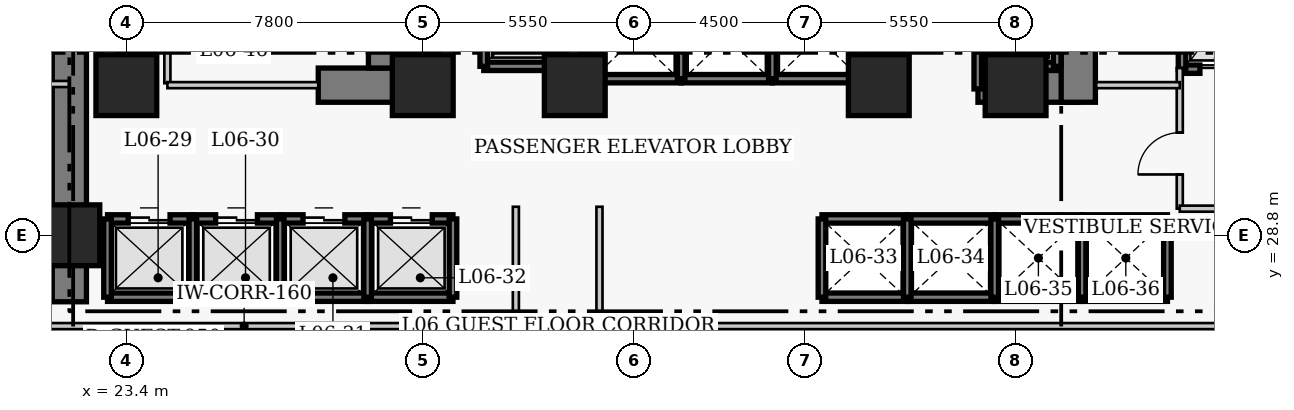
"""IFC4 building model, lengths in metres.
Left out: names, types, materials, properties, quantities, classifications, styles, units other than length and angle.
Written with IfcOpenShell. Run it as: python <this file> out.ifc"""

import sys

from ifc_helpers import new_model, si_unit, direction, frame, frame_2d, origin, origin_2d, place, context, subcontext, project, spatial, rectangle, extrude, element, fill, save


model = new_model("IFC4")
c1 = context("Model", 3, precision=1e-05, world=origin(), true_north=direction((0.0, 1.0)))
c2 = subcontext(c1, "Body", "Model", "MODEL_VIEW")
j1 = project(units=[si_unit("LENGTHUNIT", "METRE"), si_unit("PLANEANGLEUNIT", "RADIAN")], contexts=[c1])
p1 = place(None, origin())
s1 = spatial("IfcSite", under=j1, at=p1, CompositionType="ELEMENT")
p2 = place(p1, origin())
s2 = spatial("IfcBuilding", under=s1, at=p2, CompositionType="ELEMENT")
p3 = place(p2, frame((0.0, 0.0, 29.8)))
s3 = spatial("IfcBuildingStorey", under=s2, at=p3, CompositionType="ELEMENT", Elevation=29.8)
p4 = place(p3, frame((21.9, 27.05, 0.0), z_axis=(0.0, 0.0, 1.0), x_axis=(0.0, 1.0, 0.0)))
e1 = element("IfcWall", 1, at=p4, inside=s3, PredefinedType="SHEAR", context=c2, shape_type="SweptSolid", body=[
    extrude(rectangle(XDim=13.72, YDim=0.9, at=frame_2d((6.86, 0.0))), origin(), (0.0, 0.0, 1.0), 3.8),
])
p5 = place(p3, frame((28.45, 32.75, 0.0), z_axis=(0.0, 0.0, 1.0), x_axis=(1.0, 0.0, 0.0)))
e2 = element("IfcWall", 2, at=p5, inside=s3, PredefinedType="SHEAR", context=c2, shape_type="SweptSolid", body=[
    extrude(rectangle(XDim=2.4, YDim=0.9, at=frame_2d((1.2, 0.0))), origin(), (0.0, 0.0, 1.0), 3.8),
])
p6 = place(p3, frame((45.81, 32.75, 0.0), z_axis=(0.0, 0.0, 1.0), x_axis=(1.0, 0.0, 0.0)))
e3 = element("IfcWall", 3, at=p6, inside=s3, PredefinedType="SHEAR", context=c2, shape_type="SweptSolid", body=[
    extrude(rectangle(XDim=2.64, YDim=0.9, at=frame_2d((1.32, 0.0))), origin(), (0.0, 0.0, 1.0), 3.8),
])
p7 = place(p3, frame((30.22, 33.2, 0.0), z_axis=(0.0, 0.0, 1.0), x_axis=(0.0, 1.0, 0.0)))
e4 = element("IfcWall", 4, at=p7, inside=s3, PredefinedType="SHEAR", context=c2, shape_type="SweptSolid", body=[
    extrude(rectangle(XDim=7.12, YDim=0.9, at=frame_2d((3.56, 0.0))), origin(), (0.0, 0.0, 1.0), 3.8),
])
p8 = place(p3, frame((48.45, 32.3, 0.0), z_axis=(0.0, 0.0, 1.0), x_axis=(0.0, 1.0, 0.0)))
e5 = element("IfcWall", 5, at=p8, inside=s3, PredefinedType="SHEAR", context=c2, shape_type="SweptSolid", body=[
    extrude(rectangle(XDim=8.02, YDim=0.9, at=frame_2d((4.01, 0.0))), origin(), (0.0, 0.0, 1.0), 3.8),
])
p9 = place(p8, frame((5.9, 0.0, 0.0)))
e6 = element("IfcOpeningElement", 6, at=p9, cuts=e5, PredefinedType="OPENING", context=c2, shape_type="SweptSolid", body=[
    extrude(rectangle(XDim=1.1, YDim=2.15, at=frame_2d((0.55, 1.075))), frame((0.0, 0.46, 0.0), z_axis=(0.0, -1.0, 0.0), x_axis=(1.0, 0.0, 0.0)), (0.0, 0.0, 1.0), 0.92),
])
for number, where, z_axis, x_axis in (
    (7, (21.9, 28.8, 0.0), (0.0, 0.0, 1.0), (1.0, 0.0, 0.0)),
    (8, (23.4, 32.75, 0.0), (0.0, 0.0, 1.0), (1.0, 0.0, 0.0)),
    (9, (31.2, 32.75, 0.0), (0.0, 0.0, 1.0), (1.0, 0.0, 0.0)),
    (10, (35.2, 32.75, 0.0), (0.0, 0.0, 1.0), (1.0, 0.0, 0.0)),
    (11, (43.2, 32.75, 0.0), (0.0, 0.0, 1.0), (1.0, 0.0, 0.0)),
    (12, (46.8, 32.75, 0.0), (0.0, 0.0, 1.0), (1.0, 0.0, 0.0)),
):
    element("IfcColumn", number, at=place(p3, frame(where, z_axis=z_axis, x_axis=x_axis)), inside=s3, PredefinedType="COLUMN", context=c2, shape_type="SweptSolid", body=[
        extrude(rectangle(XDim=1.6, YDim=1.6, at=origin_2d()), origin(), (0.0, 0.0, 1.0), 3.8),
    ])
p10 = place(p3, frame((22.905, 29.23, 0.0), z_axis=(0.0, 0.0, 1.0), x_axis=(1.0, 0.0, 0.0)))
e13 = element("IfcWall", 13, at=p10, inside=s3, PredefinedType="SHEAR", context=c2, shape_type="SweptSolid", body=[
    extrude(rectangle(XDim=2.245, YDim=0.22, at=frame_2d((1.123, 0.0))), origin(), (0.0, 0.0, 1.0), 3.8),
])
p11 = place(p10, frame((0.545, 0.0, 0.0)))
e14 = element("IfcOpeningElement", 14, at=p11, cuts=e13, PredefinedType="OPENING", context=c2, shape_type="SweptSolid", body=[
    extrude(rectangle(XDim=1.1, YDim=2.15, at=frame_2d((0.55, 1.075))), frame((0.0, 0.12, 0.0), z_axis=(0.0, -1.0, 0.0), x_axis=(1.0, 0.0, 0.0)), (0.0, 0.0, 1.0), 0.24),
])
p12 = place(p3, frame((22.905, 27.17, 0.0), z_axis=(0.0, 0.0, 1.0), x_axis=(1.0, 0.0, 0.0)))
e15 = element("IfcWall", 15, at=p12, inside=s3, PredefinedType="SHEAR", context=c2, shape_type="SweptSolid", body=[
    extrude(rectangle(XDim=2.245, YDim=0.22, at=frame_2d((1.123, 0.0))), origin(), (0.0, 0.0, 1.0), 3.8),
])
p13 = place(p3, frame((22.905, 27.17, 0.0), z_axis=(0.0, 0.0, 1.0), x_axis=(0.0, 1.0, 0.0)))
e16 = element("IfcWall", 16, at=p13, inside=s3, PredefinedType="SHEAR", context=c2, shape_type="SweptSolid", body=[
    extrude(rectangle(XDim=2.06, YDim=0.2, at=frame_2d((1.03, 0.0))), origin(), (0.0, 0.0, 1.0), 3.8),
])
p14 = place(p3, frame((25.15, 29.23, 0.0), z_axis=(0.0, 0.0, 1.0), x_axis=(1.0, 0.0, 0.0)))
e17 = element("IfcWall", 17, at=p14, inside=s3, PredefinedType="SHEAR", context=c2, shape_type="SweptSolid", body=[
    extrude(rectangle(XDim=2.3, YDim=0.22, at=frame_2d((1.15, 0.0))), origin(), (0.0, 0.0, 1.0), 3.8),
])
p15 = place(p14, frame((0.6, 0.0, 0.0)))
e18 = element("IfcOpeningElement", 18, at=p15, cuts=e17, PredefinedType="OPENING", context=c2, shape_type="SweptSolid", body=[
    extrude(rectangle(XDim=1.1, YDim=2.15, at=frame_2d((0.55, 1.075))), frame((0.0, 0.12, 0.0), z_axis=(0.0, -1.0, 0.0), x_axis=(1.0, 0.0, 0.0)), (0.0, 0.0, 1.0), 0.24),
])
p16 = place(p3, frame((25.15, 27.17, 0.0), z_axis=(0.0, 0.0, 1.0), x_axis=(1.0, 0.0, 0.0)))
e19 = element("IfcWall", 19, at=p16, inside=s3, PredefinedType="SHEAR", context=c2, shape_type="SweptSolid", body=[
    extrude(rectangle(XDim=2.3, YDim=0.22, at=frame_2d((1.15, 0.0))), origin(), (0.0, 0.0, 1.0), 3.8),
])
p17 = place(p3, frame((25.15, 27.17, 0.0), z_axis=(0.0, 0.0, 1.0), x_axis=(0.0, 1.0, 0.0)))
e20 = element("IfcWall", 20, at=p17, inside=s3, PredefinedType="SHEAR", context=c2, shape_type="SweptSolid", body=[
    extrude(rectangle(XDim=2.06, YDim=0.2, at=frame_2d((1.03, 0.0))), origin(), (0.0, 0.0, 1.0), 3.8),
])
p18 = place(p3, frame((27.45, 29.23, 0.0), z_axis=(0.0, 0.0, 1.0), x_axis=(1.0, 0.0, 0.0)))
e21 = element("IfcWall", 21, at=p18, inside=s3, PredefinedType="SHEAR", context=c2, shape_type="SweptSolid", body=[
    extrude(rectangle(XDim=2.3, YDim=0.22, at=frame_2d((1.15, 0.0))), origin(), (0.0, 0.0, 1.0), 3.8),
])
p19 = place(p18, frame((0.6, 0.0, 0.0)))
e22 = element("IfcOpeningElement", 22, at=p19, cuts=e21, PredefinedType="OPENING", context=c2, shape_type="SweptSolid", body=[
    extrude(rectangle(XDim=1.1, YDim=2.15, at=frame_2d((0.55, 1.075))), frame((0.0, 0.12, 0.0), z_axis=(0.0, -1.0, 0.0), x_axis=(1.0, 0.0, 0.0)), (0.0, 0.0, 1.0), 0.24),
])
p20 = place(p3, frame((27.45, 27.17, 0.0), z_axis=(0.0, 0.0, 1.0), x_axis=(1.0, 0.0, 0.0)))
e23 = element("IfcWall", 23, at=p20, inside=s3, PredefinedType="SHEAR", context=c2, shape_type="SweptSolid", body=[
    extrude(rectangle(XDim=2.3, YDim=0.22, at=frame_2d((1.15, 0.0))), origin(), (0.0, 0.0, 1.0), 3.8),
])
p21 = place(p3, frame((27.45, 27.17, 0.0), z_axis=(0.0, 0.0, 1.0), x_axis=(0.0, 1.0, 0.0)))
e24 = element("IfcWall", 24, at=p21, inside=s3, PredefinedType="SHEAR", context=c2, shape_type="SweptSolid", body=[
    extrude(rectangle(XDim=2.06, YDim=0.2, at=frame_2d((1.03, 0.0))), origin(), (0.0, 0.0, 1.0), 3.8),
])
p22 = place(p3, frame((29.75, 29.23, 0.0), z_axis=(0.0, 0.0, 1.0), x_axis=(1.0, 0.0, 0.0)))
e25 = element("IfcWall", 25, at=p22, inside=s3, PredefinedType="SHEAR", context=c2, shape_type="SweptSolid", body=[
    extrude(rectangle(XDim=2.245, YDim=0.22, at=frame_2d((1.123, 0.0))), origin(), (0.0, 0.0, 1.0), 3.8),
])
p23 = place(p22, frame((0.6, 0.0, 0.0)))
e26 = element("IfcOpeningElement", 26, at=p23, cuts=e25, PredefinedType="OPENING", context=c2, shape_type="SweptSolid", body=[
    extrude(rectangle(XDim=1.1, YDim=2.15, at=frame_2d((0.55, 1.075))), frame((0.0, 0.12, 0.0), z_axis=(0.0, -1.0, 0.0), x_axis=(1.0, 0.0, 0.0)), (0.0, 0.0, 1.0), 0.24),
])
p24 = place(p3, frame((29.75, 27.17, 0.0), z_axis=(0.0, 0.0, 1.0), x_axis=(1.0, 0.0, 0.0)))
e27 = element("IfcWall", 27, at=p24, inside=s3, PredefinedType="SHEAR", context=c2, shape_type="SweptSolid", body=[
    extrude(rectangle(XDim=2.245, YDim=0.22, at=frame_2d((1.123, 0.0))), origin(), (0.0, 0.0, 1.0), 3.8),
])
for number, where, z_axis, x_axis in (
    (28, (29.75, 27.17, 0.0), (0.0, 0.0, 1.0), (0.0, 1.0, 0.0)),
    (29, (31.995, 27.17, 0.0), (0.0, 0.0, 1.0), (0.0, 1.0, 0.0)),
):
    element("IfcWall", number, at=place(p3, frame(where, z_axis=z_axis, x_axis=x_axis)), inside=s3, PredefinedType="SHEAR", context=c2, shape_type="SweptSolid", body=[
        extrude(rectangle(XDim=2.06, YDim=0.2, at=frame_2d((1.03, 0.0))), origin(), (0.0, 0.0, 1.0), 3.8),
    ])
for number, where, z_axis, x_axis in (
    (30, (41.705, 29.23, 0.0), (0.0, 0.0, 1.0), (1.0, 0.0, 0.0)),
    (31, (41.705, 27.17, 0.0), (0.0, 0.0, 1.0), (1.0, 0.0, 0.0)),
):
    element("IfcWall", number, at=place(p3, frame(where, z_axis=z_axis, x_axis=x_axis)), inside=s3, PredefinedType="SHEAR", context=c2, shape_type="SweptSolid", body=[
        extrude(rectangle(XDim=2.245, YDim=0.22, at=frame_2d((1.123, 0.0))), origin(), (0.0, 0.0, 1.0), 3.8),
    ])
p25 = place(p3, frame((41.705, 27.17, 0.0), z_axis=(0.0, 0.0, 1.0), x_axis=(0.0, 1.0, 0.0)))
e32 = element("IfcWall", 32, at=p25, inside=s3, PredefinedType="SHEAR", context=c2, shape_type="SweptSolid", body=[
    extrude(rectangle(XDim=2.06, YDim=0.2, at=frame_2d((1.03, 0.0))), origin(), (0.0, 0.0, 1.0), 3.8),
])
for number, where, z_axis, x_axis in (
    (33, (43.95, 29.23, 0.0), (0.0, 0.0, 1.0), (1.0, 0.0, 0.0)),
    (34, (43.95, 27.17, 0.0), (0.0, 0.0, 1.0), (1.0, 0.0, 0.0)),
):
    element("IfcWall", number, at=place(p3, frame(where, z_axis=z_axis, x_axis=x_axis)), inside=s3, PredefinedType="SHEAR", context=c2, shape_type="SweptSolid", body=[
        extrude(rectangle(XDim=2.3, YDim=0.22, at=frame_2d((1.15, 0.0))), origin(), (0.0, 0.0, 1.0), 3.8),
    ])
p26 = place(p3, frame((43.95, 27.17, 0.0), z_axis=(0.0, 0.0, 1.0), x_axis=(0.0, 1.0, 0.0)))
e35 = element("IfcWall", 35, at=p26, inside=s3, PredefinedType="SHEAR", context=c2, shape_type="SweptSolid", body=[
    extrude(rectangle(XDim=2.06, YDim=0.2, at=frame_2d((1.03, 0.0))), origin(), (0.0, 0.0, 1.0), 3.8),
])
for number, where, z_axis, x_axis in (
    (36, (46.25, 29.23, 0.0), (0.0, 0.0, 1.0), (1.0, 0.0, 0.0)),
    (37, (46.25, 27.17, 0.0), (0.0, 0.0, 1.0), (1.0, 0.0, 0.0)),
):
    element("IfcWall", number, at=place(p3, frame(where, z_axis=z_axis, x_axis=x_axis)), inside=s3, PredefinedType="SHEAR", context=c2, shape_type="SweptSolid", body=[
        extrude(rectangle(XDim=2.3, YDim=0.22, at=frame_2d((1.15, 0.0))), origin(), (0.0, 0.0, 1.0), 3.8),
    ])
p27 = place(p3, frame((46.25, 27.17, 0.0), z_axis=(0.0, 0.0, 1.0), x_axis=(0.0, 1.0, 0.0)))
e38 = element("IfcWall", 38, at=p27, inside=s3, PredefinedType="SHEAR", context=c2, shape_type="SweptSolid", body=[
    extrude(rectangle(XDim=2.06, YDim=0.2, at=frame_2d((1.03, 0.0))), origin(), (0.0, 0.0, 1.0), 3.8),
])
for number, where, z_axis, x_axis in (
    (39, (48.55, 29.23, 0.0), (0.0, 0.0, 1.0), (1.0, 0.0, 0.0)),
    (40, (48.55, 27.17, 0.0), (0.0, 0.0, 1.0), (1.0, 0.0, 0.0)),
):
    element("IfcWall", number, at=place(p3, frame(where, z_axis=z_axis, x_axis=x_axis)), inside=s3, PredefinedType="SHEAR", context=c2, shape_type="SweptSolid", body=[
        extrude(rectangle(XDim=2.245, YDim=0.22, at=frame_2d((1.123, 0.0))), origin(), (0.0, 0.0, 1.0), 3.8),
    ])
for number, where, z_axis, x_axis in (
    (41, (48.55, 27.17, 0.0), (0.0, 0.0, 1.0), (0.0, 1.0, 0.0)),
    (42, (50.795, 27.17, 0.0), (0.0, 0.0, 1.0), (0.0, 1.0, 0.0)),
):
    element("IfcWall", number, at=place(p3, frame(where, z_axis=z_axis, x_axis=x_axis)), inside=s3, PredefinedType="SHEAR", context=c2, shape_type="SweptSolid", body=[
        extrude(rectangle(XDim=2.06, YDim=0.2, at=frame_2d((1.03, 0.0))), origin(), (0.0, 0.0, 1.0), 3.8),
    ])
p28 = place(p3, frame((35.68, 32.92, 0.0), z_axis=(0.0, 0.0, 1.0), x_axis=(1.0, 0.0, 0.0)))
e43 = element("IfcWall", 43, at=p28, inside=s3, PredefinedType="SHEAR", context=c2, shape_type="SweptSolid", body=[
    extrude(rectangle(XDim=2.32, YDim=0.22, at=frame_2d((1.16, 0.0))), origin(), (0.0, 0.0, 1.0), 3.8),
])
p29 = place(p3, frame((35.68, 32.92, 0.0), z_axis=(0.0, 0.0, 1.0), x_axis=(0.0, 1.0, 0.0)))
e44 = element("IfcWall", 44, at=p29, inside=s3, PredefinedType="SHEAR", context=c2, shape_type="SweptSolid", body=[
    extrude(rectangle(XDim=2.16, YDim=0.2, at=frame_2d((1.08, 0.0))), origin(), (0.0, 0.0, 1.0), 3.8),
])
p30 = place(p3, frame((38.0, 32.92, 0.0), z_axis=(0.0, 0.0, 1.0), x_axis=(1.0, 0.0, 0.0)))
e45 = element("IfcWall", 45, at=p30, inside=s3, PredefinedType="SHEAR", context=c2, shape_type="SweptSolid", body=[
    extrude(rectangle(XDim=2.4, YDim=0.22, at=frame_2d((1.2, 0.0))), origin(), (0.0, 0.0, 1.0), 3.8),
])
p31 = place(p3, frame((38.0, 32.92, 0.0), z_axis=(0.0, 0.0, 1.0), x_axis=(0.0, 1.0, 0.0)))
e46 = element("IfcWall", 46, at=p31, inside=s3, PredefinedType="SHEAR", context=c2, shape_type="SweptSolid", body=[
    extrude(rectangle(XDim=2.16, YDim=0.2, at=frame_2d((1.08, 0.0))), origin(), (0.0, 0.0, 1.0), 3.8),
])
p32 = place(p3, frame((40.4, 32.92, 0.0), z_axis=(0.0, 0.0, 1.0), x_axis=(1.0, 0.0, 0.0)))
e47 = element("IfcWall", 47, at=p32, inside=s3, PredefinedType="SHEAR", context=c2, shape_type="SweptSolid", body=[
    extrude(rectangle(XDim=2.32, YDim=0.22, at=frame_2d((1.16, 0.0))), origin(), (0.0, 0.0, 1.0), 3.8),
])
for number, where, z_axis, x_axis in (
    (48, (40.4, 32.92, 0.0), (0.0, 0.0, 1.0), (0.0, 1.0, 0.0)),
    (49, (42.72, 32.92, 0.0), (0.0, 0.0, 1.0), (0.0, 1.0, 0.0)),
):
    element("IfcWall", number, at=place(p3, frame(where, z_axis=z_axis, x_axis=x_axis)), inside=s3, PredefinedType="SHEAR", context=c2, shape_type="SweptSolid", body=[
        extrude(rectangle(XDim=2.16, YDim=0.2, at=frame_2d((1.08, 0.0))), origin(), (0.0, 0.0, 1.0), 3.8),
    ])
p33 = place(p3, frame((51.18, 33.17, 0.0), z_axis=(0.0, 0.0, 1.0), x_axis=(1.0, 0.0, 0.0)))
e50 = element("IfcWall", 50, at=p33, inside=s3, PredefinedType="SHEAR", context=c2, shape_type="SweptSolid", body=[
    extrude(rectangle(XDim=2.42, YDim=0.22, at=frame_2d((1.21, 0.0))), origin(), (0.0, 0.0, 1.0), 3.8),
])
p34 = place(p33, frame((0.47, 0.0, 0.0)))
e51 = element("IfcOpeningElement", 51, at=p34, cuts=e50, PredefinedType="OPENING", context=c2, shape_type="SweptSolid", body=[
    extrude(rectangle(XDim=1.3, YDim=2.15, at=frame_2d((0.65, 1.075))), frame((0.0, 0.12, 0.0), z_axis=(0.0, -1.0, 0.0), x_axis=(1.0, 0.0, 0.0)), (0.0, 0.0, 1.0), 0.24),
])
p35 = place(p3, frame((51.18, 33.17, 0.0), z_axis=(0.0, 0.0, 1.0), x_axis=(0.0, 1.0, 0.0)))
e52 = element("IfcWall", 52, at=p35, inside=s3, PredefinedType="SHEAR", context=c2, shape_type="SweptSolid", body=[
    extrude(rectangle(XDim=2.86, YDim=0.2, at=frame_2d((1.43, 0.0))), origin(), (0.0, 0.0, 1.0), 3.8),
])
p36 = place(p3, frame((32.805, 33.245, 0.0), z_axis=(0.0, 0.0, 1.0), x_axis=(1.0, 0.0, 0.0)))
e53 = element("IfcWall", 53, at=p36, inside=s3, PredefinedType="SHEAR", context=c2, shape_type="SweptSolid", body=[
    extrude(rectangle(XDim=2.09, YDim=0.22, at=frame_2d((1.045, 0.0))), origin(), (0.0, 0.0, 1.0), 3.8),
])
for number, where, z_axis, x_axis in (
    (54, (32.805, 33.245, 0.0), (0.0, 0.0, 1.0), (0.0, 1.0, 0.0)),
    (55, (34.895, 33.245, 0.0), (0.0, 0.0, 1.0), (0.0, 1.0, 0.0)),
):
    element("IfcWall", number, at=place(p3, frame(where, z_axis=z_axis, x_axis=x_axis)), inside=s3, PredefinedType="SHEAR", context=c2, shape_type="SweptSolid", body=[
        extrude(rectangle(XDim=2.91, YDim=0.2, at=frame_2d((1.455, 0.0))), origin(), (0.0, 0.0, 1.0), 3.8),
    ])
p37 = place(p3, frame((45.805, 33.245, 0.0), z_axis=(0.0, 0.0, 1.0), x_axis=(1.0, 0.0, 0.0)))
e56 = element("IfcWall", 56, at=p37, inside=s3, PredefinedType="SHEAR", context=c2, shape_type="SweptSolid", body=[
    extrude(rectangle(XDim=2.09, YDim=0.22, at=frame_2d((1.045, 0.0))), origin(), (0.0, 0.0, 1.0), 3.8),
])
p38 = place(p3, frame((45.805, 32.65, 0.0), z_axis=(0.0, 0.0, 1.0), x_axis=(0.0, 1.0, 0.0)))
e57 = element("IfcWall", 57, at=p38, inside=s3, PredefinedType="SHEAR", context=c2, shape_type="SweptSolid", body=[
    extrude(rectangle(XDim=3.505, YDim=0.2, at=frame_2d((1.752, 0.0))), origin(), (0.0, 0.0, 1.0), 3.8),
])
p39 = place(p3, frame((47.895, 33.245, 0.0), z_axis=(0.0, 0.0, 1.0), x_axis=(0.0, 1.0, 0.0)))
e58 = element("IfcWall", 58, at=p39, inside=s3, PredefinedType="SHEAR", context=c2, shape_type="SweptSolid", body=[
    extrude(rectangle(XDim=2.91, YDim=0.2, at=frame_2d((1.455, 0.0))), origin(), (0.0, 0.0, 1.0), 3.8),
])
p40 = place(p3, frame((24.48, 32.8, 0.0), z_axis=(0.0, 0.0, 1.0), x_axis=(0.0, 1.0, 0.0)))
e59 = element("IfcWall", 59, at=p40, inside=s3, PredefinedType="PARTITIONING", context=c2, shape_type="SweptSolid", body=[
    extrude(rectangle(XDim=3.57, YDim=0.16, at=frame_2d((1.785, 0.0))), origin(), (0.0, 0.0, 1.0), 3.54),
])
p41 = place(p40, frame((1.604, 0.0, 0.0)))
e60 = element("IfcOpeningElement", 60, at=p41, cuts=e59, PredefinedType="OPENING", context=c2, shape_type="SweptSolid", body=[
    extrude(rectangle(XDim=0.9, YDim=2.1, at=frame_2d((0.45, 1.05))), frame((0.0, 0.09, 0.0), z_axis=(0.0, -1.0, 0.0), x_axis=(1.0, 0.0, 0.0)), (0.0, 0.0, 1.0), 0.18),
])
p42 = place(p3, frame((51.12, 29.5, 0.0), z_axis=(0.0, 0.0, 1.0), x_axis=(0.0, 1.0, 0.0)))
e61 = element("IfcWall", 61, at=p42, inside=s3, PredefinedType="PARTITIONING", context=c2, shape_type="SweptSolid", body=[
    extrude(rectangle(XDim=3.7, YDim=0.16, at=frame_2d((1.85, 0.0))), origin(), (0.0, 0.0, 1.0), 3.54),
])
p43 = place(p42, frame((0.9, 0.0, 0.0)))
e62 = element("IfcOpeningElement", 62, at=p43, cuts=e61, PredefinedType="OPENING", context=c2, shape_type="SweptSolid", body=[
    extrude(rectangle(XDim=1.1, YDim=2.15, at=frame_2d((0.55, 1.075))), frame((0.0, 0.09, 0.0), z_axis=(0.0, -1.0, 0.0), x_axis=(1.0, 0.0, 0.0)), (0.0, 0.0, 1.0), 0.18),
])
p44 = place(p3, frame((51.12, 29.5, 0.0), z_axis=(0.0, 0.0, 1.0), x_axis=(1.0, 0.0, 0.0)))
e63 = element("IfcWall", 63, at=p44, inside=s3, PredefinedType="PARTITIONING", context=c2, shape_type="SweptSolid", body=[
    extrude(rectangle(XDim=5.63, YDim=0.16, at=frame_2d((2.815, 0.0))), origin(), (0.0, 0.0, 1.0), 3.54),
])
p45 = place(p3, frame((24.48, 32.75, 0.0), z_axis=(0.0, 0.0, 1.0), x_axis=(1.0, 0.0, 0.0)))
e64 = element("IfcWall", 64, at=p45, inside=s3, PredefinedType="PARTITIONING", context=c2, shape_type="SweptSolid", body=[
    extrude(rectangle(XDim=3.97, YDim=0.16, at=frame_2d((1.985, 0.0))), origin(), (0.0, 0.0, 1.0), 3.54),
])
p46 = place(p3, frame((48.92, 32.75, 0.0), z_axis=(0.0, 0.0, 1.0), x_axis=(1.0, 0.0, 0.0)))
e65 = element("IfcWall", 65, at=p46, inside=s3, PredefinedType="PARTITIONING", context=c2, shape_type="SweptSolid", body=[
    extrude(rectangle(XDim=2.2, YDim=0.16, at=frame_2d((1.1, 0.0))), origin(), (0.0, 0.0, 1.0), 3.54),
])
p47 = place(p3, frame((19.35, 26.41, 0.0), z_axis=(0.0, 0.0, 1.0), x_axis=(1.0, 0.0, 0.0)))
e66 = element("IfcWall", 66, at=p47, inside=s3, PredefinedType="PARTITIONING", context=c2, shape_type="SweptSolid", body=[
    extrude(rectangle(XDim=14.3, YDim=0.16, at=frame_2d((7.15, 0.0))), origin(), (0.0, 0.0, 1.0), 3.54),
])
p48 = place(p3, frame((35.85, 26.41, 0.0), z_axis=(0.0, 0.0, 1.0), x_axis=(1.0, 0.0, 0.0)))
e67 = element("IfcWall", 67, at=p48, inside=s3, PredefinedType="PARTITIONING", context=c2, shape_type="SweptSolid", body=[
    extrude(rectangle(XDim=22.8, YDim=0.16, at=frame_2d((11.4, 0.0))), origin(), (0.0, 0.0, 1.0), 3.54),
])
for number, where, z_axis, x_axis in (
    (68, (33.65, 26.41, 0.0), (0.0, 0.0, 1.0), (0.0, 1.0, 0.0)),
    (69, (35.85, 26.41, 0.0), (0.0, 0.0, 1.0), (0.0, 1.0, 0.0)),
):
    element("IfcWall", number, at=place(p3, frame(where, z_axis=z_axis, x_axis=x_axis)), inside=s3, PredefinedType="PARTITIONING", context=c2, shape_type="SweptSolid", body=[
        extrude(rectangle(XDim=3.14, YDim=0.16, at=frame_2d((1.57, 0.0))), origin(), (0.0, 0.0, 1.0), 3.54),
    ])
p49 = place(p3, frame((19.41, 32.78, 0.0), z_axis=(0.0, 0.0, 1.0), x_axis=(1.0, 0.0, 0.0)))
e70 = element("IfcWall", 70, at=p49, inside=s3, PredefinedType="PARTITIONING", context=c2, shape_type="SweptSolid", body=[
    extrude(rectangle(XDim=2.49, YDim=0.16, at=frame_2d((1.245, 0.0))), origin(), (0.0, 0.0, 1.0), 3.54),
])
p50 = place(p11, origin())
e71 = element("IfcDoor", 71, at=p50, inside=s3, OperationType="DOUBLE_DOOR_SLIDING", PredefinedType="DOOR", context=c2, shape_type="SweptSolid", body=[
    extrude(rectangle(XDim=1.1, YDim=2.15, at=frame_2d((0.55, 1.075))), frame((0.0, 0.025, 0.0), z_axis=(0.0, -1.0, 0.0), x_axis=(1.0, 0.0, 0.0)), (0.0, 0.0, 1.0), 0.05),
])
fill(e14, e71)
p51 = place(p15, origin())
e72 = element("IfcDoor", 72, at=p51, inside=s3, OperationType="DOUBLE_DOOR_SLIDING", PredefinedType="DOOR", context=c2, shape_type="SweptSolid", body=[
    extrude(rectangle(XDim=1.1, YDim=2.15, at=frame_2d((0.55, 1.075))), frame((0.0, 0.025, 0.0), z_axis=(0.0, -1.0, 0.0), x_axis=(1.0, 0.0, 0.0)), (0.0, 0.0, 1.0), 0.05),
])
fill(e18, e72)
p52 = place(p19, origin())
e73 = element("IfcDoor", 73, at=p52, inside=s3, OperationType="DOUBLE_DOOR_SLIDING", PredefinedType="DOOR", context=c2, shape_type="SweptSolid", body=[
    extrude(rectangle(XDim=1.1, YDim=2.15, at=frame_2d((0.55, 1.075))), frame((0.0, 0.025, 0.0), z_axis=(0.0, -1.0, 0.0), x_axis=(1.0, 0.0, 0.0)), (0.0, 0.0, 1.0), 0.05),
])
fill(e22, e73)
p53 = place(p23, origin())
e74 = element("IfcDoor", 74, at=p53, inside=s3, OperationType="DOUBLE_DOOR_SLIDING", PredefinedType="DOOR", context=c2, shape_type="SweptSolid", body=[
    extrude(rectangle(XDim=1.1, YDim=2.15, at=frame_2d((0.55, 1.075))), frame((0.0, 0.025, 0.0), z_axis=(0.0, -1.0, 0.0), x_axis=(1.0, 0.0, 0.0)), (0.0, 0.0, 1.0), 0.05),
])
fill(e26, e74)
p54 = place(p34, origin())
e75 = element("IfcDoor", 75, at=p54, inside=s3, OperationType="DOUBLE_DOOR_SLIDING", PredefinedType="DOOR", context=c2, shape_type="SweptSolid", body=[
    extrude(rectangle(XDim=1.3, YDim=2.15, at=frame_2d((0.65, 1.075))), frame((0.0, 0.025, 0.0), z_axis=(0.0, -1.0, 0.0), x_axis=(1.0, 0.0, 0.0)), (0.0, 0.0, 1.0), 0.05),
])
fill(e51, e75)
p55 = place(p43, origin())
e76 = element("IfcDoor", 76, at=p55, inside=s3, OperationType="SINGLE_SWING_LEFT", PredefinedType="DOOR", context=c2, shape_type="SweptSolid", body=[
    extrude(rectangle(XDim=1.1, YDim=2.15, at=frame_2d((0.55, 1.075))), frame((0.0, 0.025, 0.0), z_axis=(0.0, -1.0, 0.0), x_axis=(1.0, 0.0, 0.0)), (0.0, 0.0, 1.0), 0.05),
])
fill(e62, e76)
save(model, sys.argv[1])
